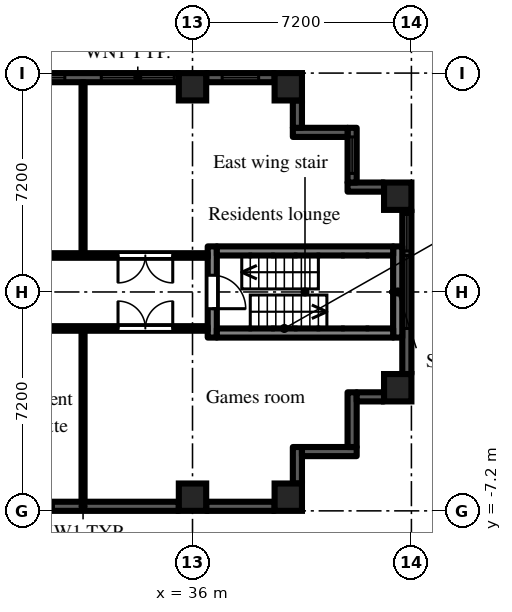
"""IFC4 building model, lengths in metres.
Left out: names, types, materials, properties, quantities, classifications, styles, units other than length and angle.
Written with IfcOpenShell. Run it as: python <this file> out.ifc"""

import sys

from ifc_helpers import new_model, si_unit, direction, frame, frame_2d, origin, origin_2d, place, context, subcontext, project, spatial, rectangle, extrude, element, fill, save


model = new_model("IFC4")
c1 = context("Model", 3, precision=1e-05, world=origin(), true_north=direction((0.0, 1.0)))
c2 = subcontext(c1, "Body", "Model", "MODEL_VIEW")
j1 = project(units=[si_unit("LENGTHUNIT", "METRE"), si_unit("PLANEANGLEUNIT", "RADIAN")], contexts=[c1])
p1 = place(None, origin())
s1 = spatial("IfcSite", under=j1, at=p1, CompositionType="ELEMENT")
p2 = place(p1, origin())
s2 = spatial("IfcBuilding", under=s1, at=p2, CompositionType="ELEMENT")
p3 = place(p2, frame((0.0, 0.0, 66.9)))
s3 = spatial("IfcBuildingStorey", under=s2, at=p3, CompositionType="ELEMENT", Elevation=66.9)
for number, where, z_axis, x_axis in (
    (1, (36.0, -6.75, 0.0), (0.0, 0.0, 1.0), (1.0, 0.0, 0.0)),
    (2, (36.0, 6.75, 0.0), (0.0, 0.0, 1.0), (1.0, 0.0, 0.0)),
    (3, (39.15, -6.75, 0.0), (0.0, 0.0, 1.0), (1.0, 0.0, 0.0)),
    (4, (39.15, 6.75, 0.0), (0.0, 0.0, 1.0), (1.0, 0.0, 0.0)),
    (5, (42.75, -3.15, 0.0), (0.0, 0.0, 1.0), (1.0, 0.0, 0.0)),
    (6, (42.75, 3.15, 0.0), (0.0, 0.0, 1.0), (1.0, 0.0, 0.0)),
):
    element("IfcColumn", number, at=place(p3, frame(where, z_axis=z_axis, x_axis=x_axis)), inside=s3, PredefinedType="COLUMN", context=c2, shape_type="SweptSolid", body=[
        extrude(rectangle(XDim=0.9, YDim=0.9, at=origin_2d()), origin(), (0.0, 0.0, 1.0), 3.0),
    ])
p4 = place(p3, frame((29.25, -7.05, 0.0), z_axis=(0.0, 0.0, 1.0), x_axis=(1.0, 0.0, 0.0)))
e7 = element("IfcWall", 7, at=p4, inside=s3, PredefinedType="SOLIDWALL", context=c2, shape_type="SweptSolid", body=[
    extrude(rectangle(XDim=6.3, YDim=0.3, at=frame_2d((3.15, 0.0))), origin(), (0.0, 0.0, 1.0), 2.1),
])
p5 = place(p4, frame((0.975, 0.0, 0.2)))
e8 = element("IfcOpeningElement", 8, at=p5, cuts=e7, PredefinedType="OPENING", context=c2, shape_type="SweptSolid", body=[
    extrude(rectangle(XDim=1.2, YDim=1.85, at=frame_2d((0.6, 0.925))), frame((0.0, 0.16, 0.0), z_axis=(0.0, -1.0, 0.0), x_axis=(1.0, 0.0, 0.0)), (0.0, 0.0, 1.0), 0.32),
])
p6 = place(p3, frame((36.45, -7.05, 0.0), z_axis=(0.0, 0.0, 1.0), x_axis=(1.0, 0.0, 0.0)))
e9 = element("IfcWall", 9, at=p6, inside=s3, PredefinedType="SOLIDWALL", context=c2, shape_type="SweptSolid", body=[
    extrude(rectangle(XDim=2.25, YDim=0.3, at=frame_2d((1.125, 0.0))), origin(), (0.0, 0.0, 1.0), 2.1),
])
p7 = place(p3, frame((39.45, -6.3, 0.0), z_axis=(0.0, 0.0, 1.0), x_axis=(0.0, 1.0, 0.0)))
e10 = element("IfcWall", 10, at=p7, inside=s3, PredefinedType="SOLIDWALL", context=c2, shape_type="SweptSolid", body=[
    extrude(rectangle(XDim=1.2, YDim=0.3, at=frame_2d((0.6, 0.0))), origin(), (0.0, 0.0, 1.0), 2.575),
])
p8 = place(p3, frame((39.6, -5.25, 0.0), z_axis=(0.0, 0.0, 1.0), x_axis=(1.0, 0.0, 0.0)))
e11 = element("IfcWall", 11, at=p8, inside=s3, PredefinedType="SOLIDWALL", context=c2, shape_type="SweptSolid", body=[
    extrude(rectangle(XDim=1.8, YDim=0.3, at=frame_2d((0.9, 0.0))), origin(), (0.0, 0.0, 1.0), 2.575),
])
p9 = place(p3, frame((41.25, -5.1, 0.0), z_axis=(0.0, 0.0, 1.0), x_axis=(0.0, 1.0, 0.0)))
e12 = element("IfcWall", 12, at=p9, inside=s3, PredefinedType="SOLIDWALL", context=c2, shape_type="SweptSolid", body=[
    extrude(rectangle(XDim=1.8, YDim=0.3, at=frame_2d((0.9, 0.0))), origin(), (0.0, 0.0, 1.0), 2.575),
])
p10 = place(p3, frame((41.4, -3.45, 0.0), z_axis=(0.0, 0.0, 1.0), x_axis=(1.0, 0.0, 0.0)))
e13 = element("IfcWall", 13, at=p10, inside=s3, PredefinedType="SOLIDWALL", context=c2, shape_type="SweptSolid", body=[
    extrude(rectangle(XDim=0.9, YDim=0.3, at=frame_2d((0.45, 0.0))), origin(), (0.0, 0.0, 1.0), 2.575),
])
p11 = place(p3, frame((43.05, -2.7, 0.0), z_axis=(0.0, 0.0, 1.0), x_axis=(0.0, 1.0, 0.0)))
e14 = element("IfcWall", 14, at=p11, inside=s3, PredefinedType="SOLIDWALL", context=c2, shape_type="SweptSolid", body=[
    extrude(rectangle(XDim=5.4, YDim=0.3, at=frame_2d((2.7, 0.0))), origin(), (0.0, 0.0, 1.0), 2.1),
])
p12 = place(p11, frame((1.5, 0.0, 0.2)))
e15 = element("IfcOpeningElement", 15, at=p12, cuts=e14, PredefinedType="OPENING", context=c2, shape_type="SweptSolid", body=[
    extrude(rectangle(XDim=2.4, YDim=1.85, at=frame_2d((1.2, 0.925))), frame((0.0, 0.16, 0.0), z_axis=(0.0, -1.0, 0.0), x_axis=(1.0, 0.0, 0.0)), (0.0, 0.0, 1.0), 0.32),
])
p13 = place(p11, frame((4.05, 0.0, 0.2)))
e16 = element("IfcOpeningElement", 16, at=p13, cuts=e14, PredefinedType="OPENING", context=c2, shape_type="SweptSolid", body=[
    extrude(rectangle(XDim=1.2, YDim=1.85, at=frame_2d((0.6, 0.925))), frame((0.0, 0.16, 0.0), z_axis=(0.0, -1.0, 0.0), x_axis=(1.0, 0.0, 0.0)), (0.0, 0.0, 1.0), 0.32),
])
p14 = place(p3, frame((42.3, 3.45, 0.0), z_axis=(0.0, 0.0, 1.0), x_axis=(-1.0, 0.0, 0.0)))
e17 = element("IfcWall", 17, at=p14, inside=s3, PredefinedType="SOLIDWALL", context=c2, shape_type="SweptSolid", body=[
    extrude(rectangle(XDim=1.2, YDim=0.3, at=frame_2d((0.6, 0.0))), origin(), (0.0, 0.0, 1.0), 2.575),
])
p15 = place(p3, frame((41.25, 3.6, 0.0), z_axis=(0.0, 0.0, 1.0), x_axis=(0.0, 1.0, 0.0)))
e18 = element("IfcWall", 18, at=p15, inside=s3, PredefinedType="SOLIDWALL", context=c2, shape_type="SweptSolid", body=[
    extrude(rectangle(XDim=1.8, YDim=0.3, at=frame_2d((0.9, 0.0))), origin(), (0.0, 0.0, 1.0), 2.575),
])
p16 = place(p15, frame((0.3, 0.0, 0.2)))
e19 = element("IfcOpeningElement", 19, at=p16, cuts=e18, PredefinedType="OPENING", context=c2, shape_type="SweptSolid", body=[
    extrude(rectangle(XDim=1.2, YDim=1.85, at=frame_2d((0.6, 0.925))), frame((0.0, 0.16, 0.0), z_axis=(0.0, -1.0, 0.0), x_axis=(1.0, 0.0, 0.0)), (0.0, 0.0, 1.0), 0.32),
])
p17 = place(p3, frame((41.1, 5.25, 0.0), z_axis=(0.0, 0.0, 1.0), x_axis=(-1.0, 0.0, 0.0)))
e20 = element("IfcWall", 20, at=p17, inside=s3, PredefinedType="SOLIDWALL", context=c2, shape_type="SweptSolid", body=[
    extrude(rectangle(XDim=1.8, YDim=0.3, at=frame_2d((0.9, 0.0))), origin(), (0.0, 0.0, 1.0), 2.575),
])
p18 = place(p3, frame((39.45, 5.4, 0.0), z_axis=(0.0, 0.0, 1.0), x_axis=(0.0, 1.0, 0.0)))
e21 = element("IfcWall", 21, at=p18, inside=s3, PredefinedType="SOLIDWALL", context=c2, shape_type="SweptSolid", body=[
    extrude(rectangle(XDim=0.9, YDim=0.3, at=frame_2d((0.45, 0.0))), origin(), (0.0, 0.0, 1.0), 2.575),
])
p19 = place(p3, frame((38.7, 7.05, 0.0), z_axis=(0.0, 0.0, 1.0), x_axis=(-1.0, 0.0, 0.0)))
e22 = element("IfcWall", 22, at=p19, inside=s3, PredefinedType="SOLIDWALL", context=c2, shape_type="SweptSolid", body=[
    extrude(rectangle(XDim=2.25, YDim=0.3, at=frame_2d((1.125, 0.0))), origin(), (0.0, 0.0, 1.0), 2.1),
])
p20 = place(p19, frame((0.525, 0.0, 0.2)))
e23 = element("IfcOpeningElement", 23, at=p20, cuts=e22, PredefinedType="OPENING", context=c2, shape_type="SweptSolid", body=[
    extrude(rectangle(XDim=1.2, YDim=1.85, at=frame_2d((0.6, 0.925))), frame((0.0, 0.16, 0.0), z_axis=(0.0, -1.0, 0.0), x_axis=(1.0, 0.0, 0.0)), (0.0, 0.0, 1.0), 0.32),
])
p21 = place(p3, frame((35.55, 7.05, 0.0), z_axis=(0.0, 0.0, 1.0), x_axis=(-1.0, 0.0, 0.0)))
e24 = element("IfcWall", 24, at=p21, inside=s3, PredefinedType="SOLIDWALL", context=c2, shape_type="SweptSolid", body=[
    extrude(rectangle(XDim=6.3, YDim=0.3, at=frame_2d((3.15, 0.0))), origin(), (0.0, 0.0, 1.0), 2.1),
])
p22 = place(p21, frame((0.15, 0.0, 0.2)))
e25 = element("IfcOpeningElement", 25, at=p22, cuts=e24, PredefinedType="OPENING", context=c2, shape_type="SweptSolid", body=[
    extrude(rectangle(XDim=2.4, YDim=1.85, at=frame_2d((1.2, 0.925))), frame((0.0, 0.16, 0.0), z_axis=(0.0, -1.0, 0.0), x_axis=(1.0, 0.0, 0.0)), (0.0, 0.0, 1.0), 0.32),
])
p23 = place(p21, frame((3.75, 0.0, 0.2)))
e26 = element("IfcOpeningElement", 26, at=p23, cuts=e24, PredefinedType="OPENING", context=c2, shape_type="SweptSolid", body=[
    extrude(rectangle(XDim=2.4, YDim=1.85, at=frame_2d((1.2, 0.925))), frame((0.0, 0.16, 0.0), z_axis=(0.0, -1.0, 0.0), x_axis=(1.0, 0.0, 0.0)), (0.0, 0.0, 1.0), 0.32),
])
p24 = place(p3, frame((36.65, -1.5, 0.0), z_axis=(0.0, 0.0, 1.0), x_axis=(0.0, 1.0, 0.0)))
e27 = element("IfcWall", 27, at=p24, inside=s3, PredefinedType="SHEAR", context=c2, shape_type="SweptSolid", body=[
    extrude(rectangle(XDim=3.0, YDim=0.3, at=frame_2d((1.5, 0.0))), origin(), (0.0, 0.0, 1.0), 2.575),
])
p25 = place(p24, frame((0.95, 0.0, 0.0)))
e28 = element("IfcOpeningElement", 28, at=p25, cuts=e27, PredefinedType="OPENING", context=c2, shape_type="SweptSolid", body=[
    extrude(rectangle(XDim=1.1, YDim=2.1, at=frame_2d((0.55, 1.05))), frame((0.0, 0.16, 0.0), z_axis=(0.0, -1.0, 0.0), x_axis=(1.0, 0.0, 0.0)), (0.0, 0.0, 1.0), 0.32),
])
p26 = place(p3, frame((42.75, -1.5, 0.0), z_axis=(0.0, 0.0, 1.0), x_axis=(0.0, 1.0, 0.0)))
e29 = element("IfcWall", 29, at=p26, inside=s3, PredefinedType="SHEAR", context=c2, shape_type="SweptSolid", body=[
    extrude(rectangle(XDim=3.0, YDim=0.3, at=frame_2d((1.5, 0.0))), origin(), (0.0, 0.0, 1.0), 2.575),
])
for number, where, z_axis, x_axis in (
    (30, (36.8, -1.35, 0.0), (0.0, 0.0, 1.0), (1.0, 0.0, 0.0)),
    (31, (36.8, 1.35, 0.0), (0.0, 0.0, 1.0), (1.0, 0.0, 0.0)),
):
    element("IfcWall", number, at=place(p3, frame(where, z_axis=z_axis, x_axis=x_axis)), inside=s3, PredefinedType="SHEAR", context=c2, shape_type="SweptSolid", body=[
        extrude(rectangle(XDim=5.8, YDim=0.3, at=frame_2d((2.9, 0.0))), origin(), (0.0, 0.0, 1.0), 2.575),
    ])
p27 = place(p3, frame((21.6, -1.2, 0.0), z_axis=(0.0, 0.0, 1.0), x_axis=(1.0, 0.0, 0.0)))
e32 = element("IfcWall", 32, at=p27, inside=s3, PredefinedType="PARTITIONING", context=c2, shape_type="SweptSolid", body=[
    extrude(rectangle(XDim=14.9, YDim=0.15, at=frame_2d((7.45, 0.0))), origin(), (0.0, 0.0, 1.0), 2.575),
])
p28 = place(p27, frame((0.2, 0.0, 0.0)))
e33 = element("IfcOpeningElement", 33, at=p28, cuts=e32, PredefinedType="OPENING", context=c2, shape_type="SweptSolid", body=[
    extrude(rectangle(XDim=1.0, YDim=2.1, at=frame_2d((0.5, 1.05))), frame((0.0, 0.085, 0.0), z_axis=(0.0, -1.0, 0.0), x_axis=(1.0, 0.0, 0.0)), (0.0, 0.0, 1.0), 0.17),
])
p29 = place(p27, frame((5.71, 0.0, 0.0)))
e34 = element("IfcOpeningElement", 34, at=p29, cuts=e32, PredefinedType="OPENING", context=c2, shape_type="SweptSolid", body=[
    extrude(rectangle(XDim=1.0, YDim=2.1, at=frame_2d((0.5, 1.05))), frame((0.0, 0.085, 0.0), z_axis=(0.0, -1.0, 0.0), x_axis=(1.0, 0.0, 0.0)), (0.0, 0.0, 1.0), 0.17),
])
p30 = place(p27, frame((11.95, 0.0, 0.0)))
e35 = element("IfcOpeningElement", 35, at=p30, cuts=e32, PredefinedType="OPENING", context=c2, shape_type="SweptSolid", body=[
    extrude(rectangle(XDim=1.8, YDim=2.1, at=frame_2d((0.9, 1.05))), frame((0.0, 0.085, 0.0), z_axis=(0.0, -1.0, 0.0), x_axis=(1.0, 0.0, 0.0)), (0.0, 0.0, 1.0), 0.17),
])
p31 = place(p3, frame((21.6, 1.2, 0.0), z_axis=(0.0, 0.0, 1.0), x_axis=(1.0, 0.0, 0.0)))
e36 = element("IfcWall", 36, at=p31, inside=s3, PredefinedType="PARTITIONING", context=c2, shape_type="SweptSolid", body=[
    extrude(rectangle(XDim=14.9, YDim=0.15, at=frame_2d((7.45, 0.0))), origin(), (0.0, 0.0, 1.0), 2.575),
])
p32 = place(p31, frame((1.35, 0.0, 0.0)))
e37 = element("IfcOpeningElement", 37, at=p32, cuts=e36, PredefinedType="OPENING", context=c2, shape_type="SweptSolid", body=[
    extrude(rectangle(XDim=0.9, YDim=2.1, at=frame_2d((0.45, 1.05))), frame((0.0, 0.085, 0.0), z_axis=(0.0, -1.0, 0.0), x_axis=(1.0, 0.0, 0.0)), (0.0, 0.0, 1.0), 0.17),
])
p33 = place(p31, frame((6.3, 0.0, 0.0)))
e38 = element("IfcOpeningElement", 38, at=p33, cuts=e36, PredefinedType="OPENING", context=c2, shape_type="SweptSolid", body=[
    extrude(rectangle(XDim=1.8, YDim=2.1, at=frame_2d((0.9, 1.05))), frame((0.0, 0.085, 0.0), z_axis=(0.0, -1.0, 0.0), x_axis=(1.0, 0.0, 0.0)), (0.0, 0.0, 1.0), 0.17),
])
p34 = place(p31, frame((11.95, 0.0, 0.0)))
e39 = element("IfcOpeningElement", 39, at=p34, cuts=e36, PredefinedType="OPENING", context=c2, shape_type="SweptSolid", body=[
    extrude(rectangle(XDim=1.8, YDim=2.1, at=frame_2d((0.9, 1.05))), frame((0.0, 0.085, 0.0), z_axis=(0.0, -1.0, 0.0), x_axis=(1.0, 0.0, 0.0)), (0.0, 0.0, 1.0), 0.17),
])
for number, where, z_axis, x_axis in (
    (40, (32.4, -6.9, 0.0), (0.0, 0.0, 1.0), (0.0, 1.0, 0.0)),
    (41, (32.4, 1.275, 0.0), (0.0, 0.0, 1.0), (0.0, 1.0, 0.0)),
):
    element("IfcWall", number, at=place(p3, frame(where, z_axis=z_axis, x_axis=x_axis)), inside=s3, PredefinedType="PARTITIONING", context=c2, shape_type="SweptSolid", body=[
        extrude(rectangle(XDim=5.625, YDim=0.1, at=frame_2d((2.812, 0.0))), origin(), (0.0, 0.0, 1.0), 2.575),
    ])
p35 = place(p5, origin())
e42 = element("IfcWindow", 42, at=p35, inside=s3, PartitioningType="SINGLE_PANEL", PredefinedType="WINDOW", context=c2, shape_type="SweptSolid", body=[
    extrude(rectangle(XDim=1.2, YDim=1.85, at=frame_2d((0.6, 0.925))), frame((0.0, 0.03, 0.0), z_axis=(0.0, -1.0, 0.0), x_axis=(1.0, 0.0, 0.0)), (0.0, 0.0, 1.0), 0.06),
])
fill(e8, e42)
p36 = place(p12, origin())
e43 = element("IfcWindow", 43, at=p36, inside=s3, PartitioningType="SINGLE_PANEL", PredefinedType="WINDOW", context=c2, shape_type="SweptSolid", body=[
    extrude(rectangle(XDim=2.4, YDim=1.85, at=frame_2d((1.2, 0.925))), frame((0.0, 0.03, 0.0), z_axis=(0.0, -1.0, 0.0), x_axis=(1.0, 0.0, 0.0)), (0.0, 0.0, 1.0), 0.06),
])
fill(e15, e43)
p37 = place(p13, origin())
e44 = element("IfcWindow", 44, at=p37, inside=s3, PartitioningType="SINGLE_PANEL", PredefinedType="WINDOW", context=c2, shape_type="SweptSolid", body=[
    extrude(rectangle(XDim=1.2, YDim=1.85, at=frame_2d((0.6, 0.925))), frame((0.0, 0.03, 0.0), z_axis=(0.0, -1.0, 0.0), x_axis=(1.0, 0.0, 0.0)), (0.0, 0.0, 1.0), 0.06),
])
fill(e16, e44)
p38 = place(p16, origin())
e45 = element("IfcWindow", 45, at=p38, inside=s3, PartitioningType="SINGLE_PANEL", PredefinedType="WINDOW", context=c2, shape_type="SweptSolid", body=[
    extrude(rectangle(XDim=1.2, YDim=1.85, at=frame_2d((0.6, 0.925))), frame((0.0, 0.03, 0.0), z_axis=(0.0, -1.0, 0.0), x_axis=(1.0, 0.0, 0.0)), (0.0, 0.0, 1.0), 0.06),
])
fill(e19, e45)
p39 = place(p20, origin())
e46 = element("IfcWindow", 46, at=p39, inside=s3, PartitioningType="SINGLE_PANEL", PredefinedType="WINDOW", context=c2, shape_type="SweptSolid", body=[
    extrude(rectangle(XDim=1.2, YDim=1.85, at=frame_2d((0.6, 0.925))), frame((0.0, 0.03, 0.0), z_axis=(0.0, -1.0, 0.0), x_axis=(1.0, 0.0, 0.0)), (0.0, 0.0, 1.0), 0.06),
])
fill(e23, e46)
p40 = place(p22, origin())
e47 = element("IfcWindow", 47, at=p40, inside=s3, PartitioningType="SINGLE_PANEL", PredefinedType="WINDOW", context=c2, shape_type="SweptSolid", body=[
    extrude(rectangle(XDim=2.4, YDim=1.85, at=frame_2d((1.2, 0.925))), frame((0.0, 0.03, 0.0), z_axis=(0.0, -1.0, 0.0), x_axis=(1.0, 0.0, 0.0)), (0.0, 0.0, 1.0), 0.06),
])
fill(e25, e47)
p41 = place(p23, origin())
e48 = element("IfcWindow", 48, at=p41, inside=s3, PartitioningType="SINGLE_PANEL", PredefinedType="WINDOW", context=c2, shape_type="SweptSolid", body=[
    extrude(rectangle(XDim=2.4, YDim=1.85, at=frame_2d((1.2, 0.925))), frame((0.0, 0.03, 0.0), z_axis=(0.0, -1.0, 0.0), x_axis=(1.0, 0.0, 0.0)), (0.0, 0.0, 1.0), 0.06),
])
fill(e26, e48)
p42 = place(p25, frame((1.1, 0.0, 0.0), z_axis=(0.0, 0.0, 1.0), x_axis=(-1.0, 0.0, 0.0)))
e49 = element("IfcDoor", 49, at=p42, inside=s3, OperationType="SINGLE_SWING_RIGHT", PredefinedType="DOOR", context=c2, shape_type="SweptSolid", body=[
    extrude(rectangle(XDim=1.1, YDim=2.1, at=frame_2d((0.55, 1.05))), frame((0.0, 0.025, 0.0), z_axis=(0.0, -1.0, 0.0), x_axis=(1.0, 0.0, 0.0)), (0.0, 0.0, 1.0), 0.05),
])
fill(e28, e49)
p43 = place(p34, frame((1.8, 0.0, 0.0), z_axis=(0.0, 0.0, 1.0), x_axis=(-1.0, 0.0, 0.0)))
e50 = element("IfcDoor", 50, at=p43, inside=s3, OperationType="DOUBLE_DOOR_DOUBLE_SWING", PredefinedType="DOOR", context=c2, shape_type="SweptSolid", body=[
    extrude(rectangle(XDim=1.8, YDim=2.1, at=frame_2d((0.9, 1.05))), frame((0.0, 0.025, 0.0), z_axis=(0.0, -1.0, 0.0), x_axis=(1.0, 0.0, 0.0)), (0.0, 0.0, 1.0), 0.05),
])
fill(e39, e50)
p44 = place(p30, origin())
e51 = element("IfcDoor", 51, at=p44, inside=s3, OperationType="DOUBLE_DOOR_DOUBLE_SWING", PredefinedType="DOOR", context=c2, shape_type="SweptSolid", body=[
    extrude(rectangle(XDim=1.8, YDim=2.1, at=frame_2d((0.9, 1.05))), frame((0.0, 0.025, 0.0), z_axis=(0.0, -1.0, 0.0), x_axis=(1.0, 0.0, 0.0)), (0.0, 0.0, 1.0), 0.05),
])
fill(e35, e51)
save(model, sys.argv[1])
